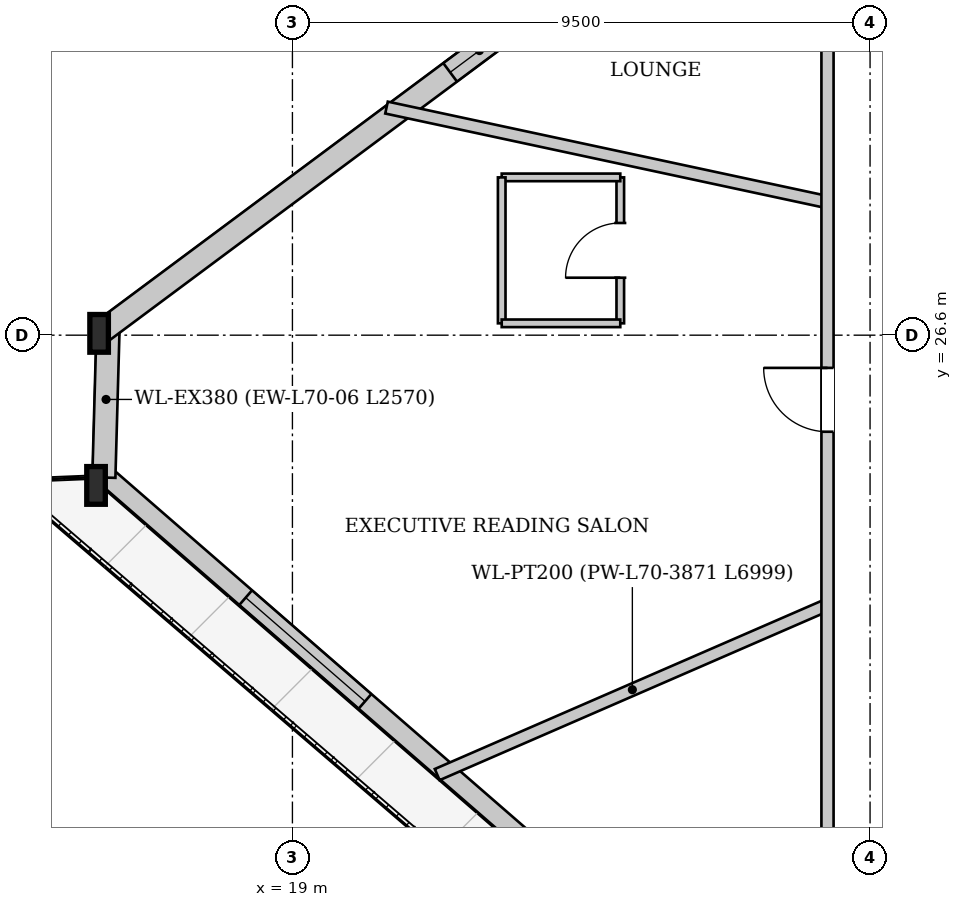
"""IFC4 building model, lengths in metres.
Left out: names, types, materials, properties, quantities, classifications, styles, units other than length and angle.
Written with IfcOpenShell. Run it as: python <this file> out.ifc"""

import sys

from ifc_helpers import new_model, si_unit, direction, frame, frame_2d, origin, origin_2d, place, context, subcontext, project, spatial, rectangle, i_section, extrude, source, transform, mapped, element, fill, save


model = new_model("IFC4")
c1 = context("Model", 3, precision=1e-05, world=origin(), true_north=direction((0.0, 1.0)))
c2 = subcontext(c1, "Body", "Model", "MODEL_VIEW")
j1 = project(units=[si_unit("LENGTHUNIT", "METRE"), si_unit("PLANEANGLEUNIT", "RADIAN")], contexts=[c1])
p1 = place(None, origin())
s1 = spatial("IfcSite", under=j1, at=p1, CompositionType="ELEMENT")
p2 = place(p1, origin())
s2 = spatial("IfcBuilding", under=s1, at=p2, CompositionType="ELEMENT")
p3 = place(p2, frame((0.0, 0.0, 263.3)))
s3 = spatial("IfcBuildingStorey", under=s2, at=p3, CompositionType="ELEMENT", Elevation=263.3)
m1 = source(origin(), c2, "Body", "SweptSolid", [
    extrude(i_section(OverallWidth=0.305, OverallDepth=0.62, WebThickness=0.021, FlangeThickness=0.04, at=origin_2d()), origin(), (0.0, 0.0, 1.0), 3.46),
])
p4 = place(p3, frame((15.781, 26.833, 0.0), z_axis=(0.023215571238, -0.117206880929, 0.992836131653), x_axis=(0.980942421764, 0.194298649464, 0.0)))
e1 = element("IfcColumn", 1, at=p4, inside=s3, PredefinedType="COLUMN", context=c2, shape_type="MappedRepresentation", body=[
    mapped(m1, transform((0.0, 0.0, 0.0), x_axis=(1.0, 0.0, 0.0), y_axis=(0.0, 1.0, 0.0), z_axis=(0.0, 0.0, 1.0), scale=1.0)),
])
m2 = source(origin(), c2, "Body", "SweptSolid", [
    extrude(i_section(OverallWidth=0.305, OverallDepth=0.62, WebThickness=0.021, FlangeThickness=0.04, at=origin_2d()), origin(), (0.0, 0.0, 1.0), 3.448),
])
p5 = place(p3, frame((15.709, 24.264, 0.0), z_axis=(0.035475827357, -0.078315898318, 0.996297187462), x_axis=(0.910901618145, 0.41262360822, 0.0)))
e2 = element("IfcColumn", 2, at=p5, inside=s3, PredefinedType="COLUMN", context=c2, shape_type="MappedRepresentation", body=[
    mapped(m2, transform((0.0, 0.0, 0.0), x_axis=(1.0, 0.0, 0.0), y_axis=(0.0, 1.0, 0.0), z_axis=(0.0, 0.0, 1.0), scale=1.0)),
])
p6 = place(p3, frame((28.885, 13.024, 0.0), z_axis=(0.0, 0.0, 1.0), x_axis=(-0.754757555723, 0.656003835415, 0.0)))
e3 = element("IfcWall", 3, at=p6, inside=s3, PredefinedType="SOLIDWALL", context=c2, shape_type="SweptSolid", body=[
    extrude(rectangle(XDim=17.318, YDim=0.32, at=frame_2d((8.659, 0.0))), origin(), (0.0, 0.0, 1.0), 2.872),
])
p7 = place(p6, frame((4.792, 0.0, 0.0)))
e4 = element("IfcOpeningElement", 4, at=p7, cuts=e3, PredefinedType="OPENING", context=c2, shape_type="SweptSolid", body=[
    extrude(rectangle(XDim=1.5, YDim=2.3, at=frame_2d((0.75, 1.15))), frame((0.0, 0.17, 0.0), z_axis=(0.0, -1.0, 0.0), x_axis=(1.0, 0.0, 0.0)), (0.0, 0.0, 1.0), 0.34),
])
p8 = place(p6, frame((11.515, 0.0, 0.402)))
e5 = element("IfcOpeningElement", 5, at=p8, cuts=e3, PredefinedType="OPENING", context=c2, shape_type="SweptSolid", body=[
    extrude(rectangle(XDim=2.6, YDim=2.35, at=frame_2d((1.3, 1.175))), frame((0.0, 0.17, 0.0), z_axis=(0.0, -1.0, 0.0), x_axis=(1.0, 0.0, 0.0)), (0.0, 0.0, 1.0), 0.34),
])
p9 = place(p3, frame((15.899, 24.259, 0.0), z_axis=(0.0, 0.0, 1.0), x_axis=(0.027933207755, 0.999609791821, 0.0)))
e6 = element("IfcWall", 6, at=p9, inside=s3, PredefinedType="SOLIDWALL", context=c2, shape_type="SweptSolid", body=[
    extrude(rectangle(XDim=2.57, YDim=0.38, at=frame_2d((1.285, 0.0))), origin(), (0.0, 0.0, 1.0), 2.872),
])
p10 = place(p3, frame((15.894, 26.68, 0.0), z_axis=(0.0, 0.0, 1.0), x_axis=(0.802229105353, 0.59701630005, 0.0)))
e7 = element("IfcWall", 7, at=p10, inside=s3, PredefinedType="SOLIDWALL", context=c2, shape_type="SweptSolid", body=[
    extrude(rectangle(XDim=21.802, YDim=0.38, at=frame_2d((10.901, 0.0))), origin(), (0.0, 0.0, 1.0), 2.872),
])
p11 = place(p10, frame((7.105, 0.0, 0.65)))
e8 = element("IfcOpeningElement", 8, at=p11, cuts=e7, PredefinedType="OPENING", context=c2, shape_type="SweptSolid", body=[
    extrude(rectangle(XDim=1.2, YDim=1.5, at=frame_2d((0.6, 0.75))), frame((0.0, 0.2, 0.0), z_axis=(0.0, -1.0, 0.0), x_axis=(1.0, 0.0, 0.0)), (0.0, 0.0, 1.0), 0.4),
])
p12 = place(p10, frame((16.698, 0.0, 0.65)))
e9 = element("IfcOpeningElement", 9, at=p12, cuts=e7, PredefinedType="OPENING", context=c2, shape_type="SweptSolid", body=[
    extrude(rectangle(XDim=1.2, YDim=1.5, at=frame_2d((0.6, 0.75))), frame((0.0, 0.2, 0.0), z_axis=(0.0, -1.0, 0.0), x_axis=(1.0, 0.0, 0.0)), (0.0, 0.0, 1.0), 0.4),
])
p13 = place(p3, frame((27.8, 22.165, 0.0), z_axis=(0.0, 0.0, 1.0), x_axis=(-0.917061183567, -0.398746517973, 0.0)))
e10 = element("IfcWall", 10, at=p13, inside=s3, PredefinedType="PARTITIONING", context=c2, shape_type="SweptSolid", body=[
    extrude(rectangle(XDim=7.0, YDim=0.2, at=frame_2d((3.5, 0.0))), origin(), (0.0, 0.0, 1.0), 3.38),
])
p14 = place(p3, frame((27.8, 28.788, 0.0), z_axis=(0.0, 0.0, 1.0), x_axis=(-0.977765791521, 0.209699921153, 0.0)))
e11 = element("IfcWall", 11, at=p14, inside=s3, PredefinedType="PARTITIONING", context=c2, shape_type="SweptSolid", body=[
    extrude(rectangle(XDim=7.417, YDim=0.2, at=frame_2d((3.709, 0.0))), origin(), (0.0, 0.0, 1.0), 3.38),
])
p15 = place(p3, frame((24.392, 26.795, 0.0), z_axis=(0.0, 0.0, 1.0), x_axis=(0.0, 1.0, 0.0)))
e12 = element("IfcWall", 12, at=p15, inside=s3, PredefinedType="PARTITIONING", context=c2, shape_type="SweptSolid", body=[
    extrude(rectangle(XDim=2.4, YDim=0.125, at=frame_2d((1.2, 0.0))), origin(), (0.0, 0.0, 1.0), 3.38),
])
p16 = place(p15, frame((0.75, 0.0, 0.0)))
e13 = element("IfcOpeningElement", 13, at=p16, cuts=e12, PredefinedType="OPENING", context=c2, shape_type="SweptSolid", body=[
    extrude(rectangle(XDim=0.9, YDim=2.1, at=frame_2d((0.45, 1.05))), frame((0.0, 0.073, 0.0), z_axis=(0.0, -1.0, 0.0), x_axis=(1.0, 0.0, 0.0)), (0.0, 0.0, 1.0), 0.145),
])
p17 = place(p3, frame((24.392, 29.195, 0.0), z_axis=(0.0, 0.0, 1.0), x_axis=(-1.0, 0.0, 0.0)))
e14 = element("IfcWall", 14, at=p17, inside=s3, PredefinedType="PARTITIONING", context=c2, shape_type="SweptSolid", body=[
    extrude(rectangle(XDim=1.95, YDim=0.125, at=frame_2d((0.975, 0.0))), origin(), (0.0, 0.0, 1.0), 3.38),
])
p18 = place(p3, frame((22.442, 29.195, 0.0), z_axis=(0.0, 0.0, 1.0), x_axis=(0.0, -1.0, 0.0)))
e15 = element("IfcWall", 15, at=p18, inside=s3, PredefinedType="PARTITIONING", context=c2, shape_type="SweptSolid", body=[
    extrude(rectangle(XDim=2.4, YDim=0.125, at=frame_2d((1.2, 0.0))), origin(), (0.0, 0.0, 1.0), 3.38),
])
p19 = place(p3, frame((22.442, 26.795, 0.0), z_axis=(0.0, 0.0, 1.0), x_axis=(1.0, 0.0, 0.0)))
e16 = element("IfcWall", 16, at=p19, inside=s3, PredefinedType="PARTITIONING", context=c2, shape_type="SweptSolid", body=[
    extrude(rectangle(XDim=1.95, YDim=0.125, at=frame_2d((0.975, 0.0))), origin(), (0.0, 0.0, 1.0), 3.055),
])
p20 = place(p3, frame((27.8, 17.2, 0.0), z_axis=(0.0, 0.0, 1.0), x_axis=(0.0, 1.0, 0.0)))
e17 = element("IfcWall", 17, at=p20, inside=s3, PredefinedType="PARTITIONING", context=c2, shape_type="SweptSolid", body=[
    extrude(rectangle(XDim=18.54, YDim=0.2, at=frame_2d((9.27, 0.0))), origin(), (0.0, 0.0, 1.0), 3.38),
])
p21 = place(p20, frame((15.043, 0.0, 0.0)))
e18 = element("IfcOpeningElement", 18, at=p21, cuts=e17, PredefinedType="OPENING", context=c2, shape_type="SweptSolid", body=[
    extrude(rectangle(XDim=1.05, YDim=2.2, at=frame_2d((0.525, 1.1))), frame((0.0, 0.11, 0.0), z_axis=(0.0, -1.0, 0.0), x_axis=(1.0, 0.0, 0.0)), (0.0, 0.0, 1.0), 0.22),
])
p22 = place(p20, frame((7.812, 0.0, 0.0)))
e19 = element("IfcOpeningElement", 19, at=p22, cuts=e17, PredefinedType="OPENING", context=c2, shape_type="SweptSolid", body=[
    extrude(rectangle(XDim=1.05, YDim=2.2, at=frame_2d((0.525, 1.1))), frame((0.0, 0.11, 0.0), z_axis=(0.0, -1.0, 0.0), x_axis=(1.0, 0.0, 0.0)), (0.0, 0.0, 1.0), 0.22),
])
m3 = source(origin(), c2, "Body", "SweptSolid", [
    extrude(rectangle(XDim=2.6, YDim=2.35, at=frame_2d((1.3, 1.175))), frame((0.0, 0.03, 0.0), z_axis=(0.0, -1.0, 0.0), x_axis=(1.0, 0.0, 0.0)), (0.0, 0.0, 1.0), 0.06),
])
p23 = place(p8, origin())
e20 = element("IfcWindow", 20, at=p23, inside=s3, PartitioningType="SINGLE_PANEL", PredefinedType="WINDOW", context=c2, shape_type="MappedRepresentation", body=[
    mapped(m3, transform((0.0, 0.0, 0.0), x_axis=(1.0, 0.0, 0.0), y_axis=(0.0, 1.0, 0.0), z_axis=(0.0, 0.0, 1.0), scale=1.0)),
])
fill(e5, e20)
m4 = source(origin(), c2, "Body", "SweptSolid", [
    extrude(rectangle(XDim=1.2, YDim=1.5, at=frame_2d((0.6, 0.75))), frame((0.0, 0.03, 0.0), z_axis=(0.0, -1.0, 0.0), x_axis=(1.0, 0.0, 0.0)), (0.0, 0.0, 1.0), 0.06),
])
p24 = place(p11, origin())
e21 = element("IfcWindow", 21, at=p24, inside=s3, PartitioningType="SINGLE_PANEL", PredefinedType="WINDOW", context=c2, shape_type="MappedRepresentation", body=[
    mapped(m4, transform((0.0, 0.0, 0.0), x_axis=(1.0, 0.0, 0.0), y_axis=(0.0, 1.0, 0.0), z_axis=(0.0, 0.0, 1.0), scale=1.0)),
])
fill(e8, e21)
m5 = source(origin(), c2, "Body", "SweptSolid", [
    extrude(rectangle(XDim=0.9, YDim=2.1, at=frame_2d((0.45, 1.05))), frame((0.0, 0.025, 0.0), z_axis=(0.0, -1.0, 0.0), x_axis=(1.0, 0.0, 0.0)), (0.0, 0.0, 1.0), 0.05),
])
p25 = place(p16, origin())
e22 = element("IfcDoor", 22, at=p25, inside=s3, OperationType="SINGLE_SWING_LEFT", PredefinedType="DOOR", context=c2, shape_type="MappedRepresentation", body=[
    mapped(m5, transform((0.0, 0.0, 0.0), x_axis=(1.0, 0.0, 0.0), y_axis=(0.0, 1.0, 0.0), z_axis=(0.0, 0.0, 1.0), scale=1.0)),
])
fill(e13, e22)
m6 = source(origin(), c2, "Body", "SweptSolid", [
    extrude(rectangle(XDim=1.05, YDim=2.2, at=frame_2d((0.525, 1.1))), frame((0.0, 0.025, 0.0), z_axis=(0.0, -1.0, 0.0), x_axis=(1.0, 0.0, 0.0)), (0.0, 0.0, 1.0), 0.05),
])
p26 = place(p22, origin())
e23 = element("IfcDoor", 23, at=p26, inside=s3, OperationType="SINGLE_SWING_RIGHT", PredefinedType="DOOR", context=c2, shape_type="MappedRepresentation", body=[
    mapped(m6, transform((0.0, 0.0, 0.0), x_axis=(1.0, 0.0, 0.0), y_axis=(0.0, 1.0, 0.0), z_axis=(0.0, 0.0, 1.0), scale=1.0)),
])
fill(e19, e23)
save(model, sys.argv[1])
